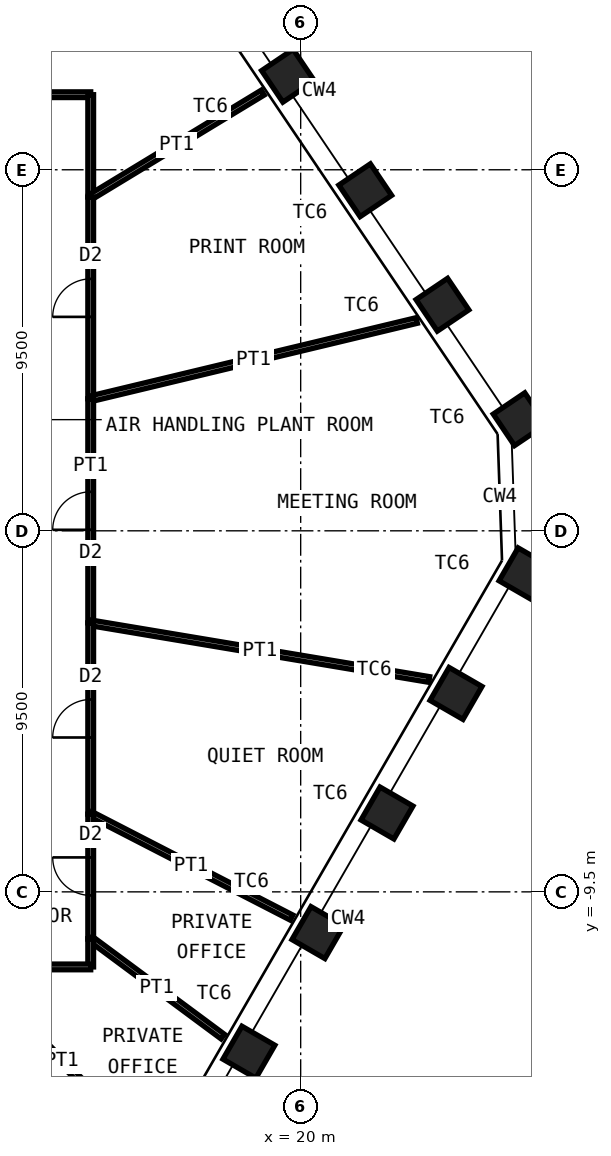
"""IFC4 building model, lengths in metres.
Left out: names, types, materials, properties, quantities, classifications, styles, units other than length and angle.
Written with IfcOpenShell. Run it as: python <this file> out.ifc"""

import sys

from ifc_helpers import new_model, si_unit, direction, frame, frame_2d, origin, origin_2d, place, context, subcontext, project, spatial, rectangle, hollow_rectangle, extrude, element, fill, save


model = new_model("IFC4")
c1 = context("Model", 3, precision=1e-05, world=origin(), true_north=direction((0.0, 1.0)))
c2 = subcontext(c1, "Body", "Model", "MODEL_VIEW")
j1 = project(units=[si_unit("LENGTHUNIT", "METRE"), si_unit("PLANEANGLEUNIT", "RADIAN")], contexts=[c1])
p1 = place(None, origin())
s1 = spatial("IfcSite", under=j1, at=p1, CompositionType="ELEMENT")
p2 = place(p1, origin())
s2 = spatial("IfcBuilding", under=s1, at=p2, CompositionType="ELEMENT")
p3 = place(p2, frame((0.0, 0.0, 239.2)))
s3 = spatial("IfcBuildingStorey", under=s2, at=p3, CompositionType="ELEMENT", Elevation=239.2)
for number, where, z_axis, x_axis in (
    (1, (19.667, 11.973, 0.0), (0.0, 0.0, 1.0), (-0.559, 0.829, 0.0)),
    (2, (21.699, 8.961, 0.0), (0.0, 0.0, 1.0), (-0.559, 0.829, 0.0)),
    (3, (23.731, 5.948, 0.0), (0.0, 0.0, 1.0), (-0.559, 0.829, 0.0)),
    (4, (25.762, 2.936, 0.0), (0.0, 0.0, 1.0), (-0.559, 0.829, 0.0)),
    (5, (25.905, -1.132, 0.0), (0.0, 0.0, 1.0), (0.5, 0.866, 0.0)),
    (6, (24.088, -4.279, 0.0), (0.0, 0.0, 1.0), (0.5, 0.866, 0.0)),
    (7, (22.271, -7.426, 0.0), (0.0, 0.0, 1.0), (0.5, 0.866, 0.0)),
    (8, (20.454, -10.572, 0.0), (0.0, 0.0, 1.0), (0.5, 0.866, 0.0)),
    (9, (18.637, -13.719, 0.0), (0.0, 0.0, 1.0), (0.5, 0.866, 0.0)),
):
    element("IfcColumn", number, at=place(p3, frame(where, z_axis=z_axis, x_axis=x_axis)), inside=s3, PredefinedType="COLUMN", context=c2, shape_type="SweptSolid", body=[
        extrude(hollow_rectangle(XDim=1.0, YDim=1.0, WallThickness=0.06, at=origin_2d()), origin(), (0.0, 0.0, 1.0), 4.2),
    ])
p4 = place(p3, frame((14.958, 17.531, 0.0), z_axis=(0.0, 0.0, 1.0), x_axis=(-0.649097500837, -0.760705221756, 0.0)))
e10 = element("IfcWall", 10, at=p4, inside=s3, PredefinedType="PARTITIONING", context=c2, shape_type="SweptSolid", body=[
    extrude(rectangle(XDim=7.96, YDim=0.15, at=frame_2d((3.98, 0.0))), origin(), (0.0, 0.0, 1.0), 3.43),
])
p5 = place(p3, frame((9.791, 11.475, 0.0), z_axis=(0.0, 0.0, 1.0), x_axis=(1.0, 0.0, 0.0)))
e11 = element("IfcWall", 11, at=p5, inside=s3, PredefinedType="PARTITIONING", context=c2, shape_type="SweptSolid", body=[
    extrude(rectangle(XDim=4.684, YDim=0.15, at=frame_2d((2.342, 0.0))), origin(), (0.0, 0.0, 1.0), 4.03),
])
p6 = place(p5, frame((1.842, 0.0, 0.0)))
e12 = element("IfcOpeningElement", 12, at=p6, cuts=e11, PredefinedType="OPENING", context=c2, shape_type="SweptSolid", body=[
    extrude(rectangle(XDim=1.0, YDim=2.4, at=frame_2d((0.5, 1.2))), frame((0.0, 0.085, 0.0), z_axis=(0.0, -1.0, 0.0), x_axis=(1.0, 0.0, 0.0)), (0.0, 0.0, 1.0), 0.17),
])
p7 = place(p3, frame((14.475, 11.475, 0.0), z_axis=(0.0, 0.0, 1.0), x_axis=(0.0, -1.0, 0.0)))
e13 = element("IfcWall", 13, at=p7, inside=s3, PredefinedType="PARTITIONING", context=c2, shape_type="SweptSolid", body=[
    extrude(rectangle(XDim=2.692, YDim=0.15, at=frame_2d((1.346, 0.0))), origin(), (0.0, 0.0, 1.0), 4.03),
])
p8 = place(p3, frame((19.001, 11.53, 0.0), z_axis=(0.0, 0.0, 1.0), x_axis=(-0.854906581035, -0.518781975114, 0.0)))
e14 = element("IfcWall", 14, at=p8, inside=s3, PredefinedType="PARTITIONING", context=c2, shape_type="SweptSolid", body=[
    extrude(rectangle(XDim=5.294, YDim=0.15, at=frame_2d((2.647, 0.0))), origin(), (0.0, 0.0, 1.0), 3.43),
])
p9 = place(p3, frame((14.475, 8.783, 0.0), z_axis=(0.0, 0.0, 1.0), x_axis=(0.0, -1.0, 0.0)))
e15 = element("IfcWall", 15, at=p9, inside=s3, PredefinedType="PARTITIONING", context=c2, shape_type="SweptSolid", body=[
    extrude(rectangle(XDim=5.309, YDim=0.15, at=frame_2d((2.654, 0.0))), origin(), (0.0, 0.0, 1.0), 4.03),
])
p10 = place(p9, frame((2.154, 0.0, 0.0)))
e16 = element("IfcOpeningElement", 16, at=p10, cuts=e15, PredefinedType="OPENING", context=c2, shape_type="SweptSolid", body=[
    extrude(rectangle(XDim=1.0, YDim=2.4, at=frame_2d((0.5, 1.2))), frame((0.0, 0.085, 0.0), z_axis=(0.0, -1.0, 0.0), x_axis=(1.0, 0.0, 0.0)), (0.0, 0.0, 1.0), 0.17),
])
p11 = place(p3, frame((23.053, 5.534, 0.0), z_axis=(0.0, 0.0, 1.0), x_axis=(-0.972377252501, -0.233414821335, 0.0)))
e17 = element("IfcWall", 17, at=p11, inside=s3, PredefinedType="PARTITIONING", context=c2, shape_type="SweptSolid", body=[
    extrude(rectangle(XDim=8.822, YDim=0.15, at=frame_2d((4.411, 0.0))), origin(), (0.0, 0.0, 1.0), 3.43),
])
p12 = place(p3, frame((14.475, 3.475, 0.0), z_axis=(0.0, 0.0, 1.0), x_axis=(0.0, -1.0, 0.0)))
e18 = element("IfcWall", 18, at=p12, inside=s3, PredefinedType="PARTITIONING", context=c2, shape_type="SweptSolid", body=[
    extrude(rectangle(XDim=5.896, YDim=0.15, at=frame_2d((2.948, 0.0))), origin(), (0.0, 0.0, 1.0), 4.03),
])
p13 = place(p12, frame((2.448, 0.0, 0.0)))
e19 = element("IfcOpeningElement", 19, at=p13, cuts=e18, PredefinedType="OPENING", context=c2, shape_type="SweptSolid", body=[
    extrude(rectangle(XDim=1.0, YDim=2.4, at=frame_2d((0.5, 1.2))), frame((0.0, 0.085, 0.0), z_axis=(0.0, -1.0, 0.0), x_axis=(1.0, 0.0, 0.0)), (0.0, 0.0, 1.0), 0.17),
])
p14 = place(p3, frame((23.383, -3.912, 0.0), z_axis=(0.0, 0.0, 1.0), x_axis=(-0.986293651891, 0.164999491631, 0.0)))
e20 = element("IfcWall", 20, at=p14, inside=s3, PredefinedType="PARTITIONING", context=c2, shape_type="SweptSolid", body=[
    extrude(rectangle(XDim=9.032, YDim=0.15, at=frame_2d((4.516, 0.0))), origin(), (0.0, 0.0, 1.0), 3.43),
])
p15 = place(p3, frame((14.475, -2.422, 0.0), z_axis=(0.0, 0.0, 1.0), x_axis=(0.0, -1.0, 0.0)))
e21 = element("IfcWall", 21, at=p15, inside=s3, PredefinedType="PARTITIONING", context=c2, shape_type="SweptSolid", body=[
    extrude(rectangle(XDim=5.033, YDim=0.15, at=frame_2d((2.517, 0.0))), origin(), (0.0, 0.0, 1.0), 4.03),
])
p16 = place(p15, frame((2.017, 0.0, 0.0)))
e22 = element("IfcOpeningElement", 22, at=p16, cuts=e21, PredefinedType="OPENING", context=c2, shape_type="SweptSolid", body=[
    extrude(rectangle(XDim=1.0, YDim=2.4, at=frame_2d((0.5, 1.2))), frame((0.0, 0.085, 0.0), z_axis=(0.0, -1.0, 0.0), x_axis=(1.0, 0.0, 0.0)), (0.0, 0.0, 1.0), 0.17),
])
p17 = place(p3, frame((19.759, -10.177, 0.0), z_axis=(0.0, 0.0, 1.0), x_axis=(-0.889015092721, 0.457877893017, 0.0)))
e23 = element("IfcWall", 23, at=p17, inside=s3, PredefinedType="PARTITIONING", context=c2, shape_type="SweptSolid", body=[
    extrude(rectangle(XDim=5.944, YDim=0.15, at=frame_2d((2.972, 0.0))), origin(), (0.0, 0.0, 1.0), 3.43),
])
p18 = place(p3, frame((14.475, -7.455, 0.0), z_axis=(0.0, 0.0, 1.0), x_axis=(0.0, -1.0, 0.0)))
e24 = element("IfcWall", 24, at=p18, inside=s3, PredefinedType="PARTITIONING", context=c2, shape_type="SweptSolid", body=[
    extrude(rectangle(XDim=3.277, YDim=0.15, at=frame_2d((1.639, 0.0))), origin(), (0.0, 0.0, 1.0), 4.03),
])
p19 = place(p18, frame((1.139, 0.0, 0.0)))
e25 = element("IfcOpeningElement", 25, at=p19, cuts=e24, PredefinedType="OPENING", context=c2, shape_type="SweptSolid", body=[
    extrude(rectangle(XDim=1.0, YDim=2.4, at=frame_2d((0.5, 1.2))), frame((0.0, 0.085, 0.0), z_axis=(0.0, -1.0, 0.0), x_axis=(1.0, 0.0, 0.0)), (0.0, 0.0, 1.0), 0.17),
])
p20 = place(p3, frame((17.951, -13.309, 0.0), z_axis=(0.0, 0.0, 1.0), x_axis=(-0.803285242674, 0.595594508791, 0.0)))
e26 = element("IfcWall", 26, at=p20, inside=s3, PredefinedType="PARTITIONING", context=c2, shape_type="SweptSolid", body=[
    extrude(rectangle(XDim=4.327, YDim=0.15, at=frame_2d((2.164, 0.0))), origin(), (0.0, 0.0, 1.0), 3.43),
])
p21 = place(p3, frame((14.475, -10.732, 0.0), z_axis=(0.0, 0.0, 1.0), x_axis=(0.0, -1.0, 0.0)))
e27 = element("IfcWall", 27, at=p21, inside=s3, PredefinedType="PARTITIONING", context=c2, shape_type="SweptSolid", body=[
    extrude(rectangle(XDim=0.743, YDim=0.15, at=frame_2d((0.372, 0.0))), origin(), (0.0, 0.0, 1.0), 4.03),
])
p22 = place(p3, frame((14.475, -11.475, 0.0), z_axis=(0.0, 0.0, 1.0), x_axis=(-1.0, 0.0, 0.0)))
e28 = element("IfcWall", 28, at=p22, inside=s3, PredefinedType="PARTITIONING", context=c2, shape_type="SweptSolid", body=[
    extrude(rectangle(XDim=3.209, YDim=0.15, at=frame_2d((1.605, 0.0))), origin(), (0.0, 0.0, 1.0), 4.03),
])
p23 = place(p22, frame((1.105, 0.0, 0.0)))
e29 = element("IfcOpeningElement", 29, at=p23, cuts=e28, PredefinedType="OPENING", context=c2, shape_type="SweptSolid", body=[
    extrude(rectangle(XDim=1.0, YDim=2.4, at=frame_2d((0.5, 1.2))), frame((0.0, 0.085, 0.0), z_axis=(0.0, -1.0, 0.0), x_axis=(1.0, 0.0, 0.0)), (0.0, 0.0, 1.0), 0.17),
])
p24 = place(p3, frame((16.145, -16.444, 0.0), z_axis=(0.0, 0.0, 1.0), x_axis=(-0.700591378209, 0.71356269576, 0.0)))
e30 = element("IfcWall", 30, at=p24, inside=s3, PredefinedType="PARTITIONING", context=c2, shape_type="SweptSolid", body=[
    extrude(rectangle(XDim=6.964, YDim=0.15, at=frame_2d((3.482, 0.0))), origin(), (0.0, 0.0, 1.0), 3.43),
])
p25 = place(p3, frame((14.339, -19.582, 0.0), z_axis=(0.0, 0.0, 1.0), x_axis=(-0.590789413226, 0.806825798559, 0.0)))
e31 = element("IfcWall", 31, at=p25, inside=s3, PredefinedType="PARTITIONING", context=c2, shape_type="SweptSolid", body=[
    extrude(rectangle(XDim=10.048, YDim=0.15, at=frame_2d((5.024, 0.0))), origin(), (0.0, 0.0, 1.0), 2.93),
])
p26 = place(p10, origin())
e32 = element("IfcDoor", 32, at=p26, inside=s3, OperationType="SINGLE_SWING_RIGHT", PredefinedType="DOOR", context=c2, shape_type="SweptSolid", body=[
    extrude(rectangle(XDim=1.0, YDim=2.4, at=frame_2d((0.5, 1.2))), frame((0.0, 0.025, 0.0), z_axis=(0.0, -1.0, 0.0), x_axis=(1.0, 0.0, 0.0)), (0.0, 0.0, 1.0), 0.05),
])
fill(e16, e32)
p27 = place(p13, origin())
e33 = element("IfcDoor", 33, at=p27, inside=s3, OperationType="SINGLE_SWING_RIGHT", PredefinedType="DOOR", context=c2, shape_type="SweptSolid", body=[
    extrude(rectangle(XDim=1.0, YDim=2.4, at=frame_2d((0.5, 1.2))), frame((0.0, 0.025, 0.0), z_axis=(0.0, -1.0, 0.0), x_axis=(1.0, 0.0, 0.0)), (0.0, 0.0, 1.0), 0.05),
])
fill(e19, e33)
p28 = place(p16, origin())
e34 = element("IfcDoor", 34, at=p28, inside=s3, OperationType="SINGLE_SWING_RIGHT", PredefinedType="DOOR", context=c2, shape_type="SweptSolid", body=[
    extrude(rectangle(XDim=1.0, YDim=2.4, at=frame_2d((0.5, 1.2))), frame((0.0, 0.025, 0.0), z_axis=(0.0, -1.0, 0.0), x_axis=(1.0, 0.0, 0.0)), (0.0, 0.0, 1.0), 0.05),
])
fill(e22, e34)
p29 = place(p19, origin())
e35 = element("IfcDoor", 35, at=p29, inside=s3, OperationType="SINGLE_SWING_LEFT", PredefinedType="DOOR", context=c2, shape_type="SweptSolid", body=[
    extrude(rectangle(XDim=1.0, YDim=2.4, at=frame_2d((0.5, 1.2))), frame((0.0, 0.025, 0.0), z_axis=(0.0, -1.0, 0.0), x_axis=(1.0, 0.0, 0.0)), (0.0, 0.0, 1.0), 0.05),
])
fill(e25, e35)
save(model, sys.argv[1])
